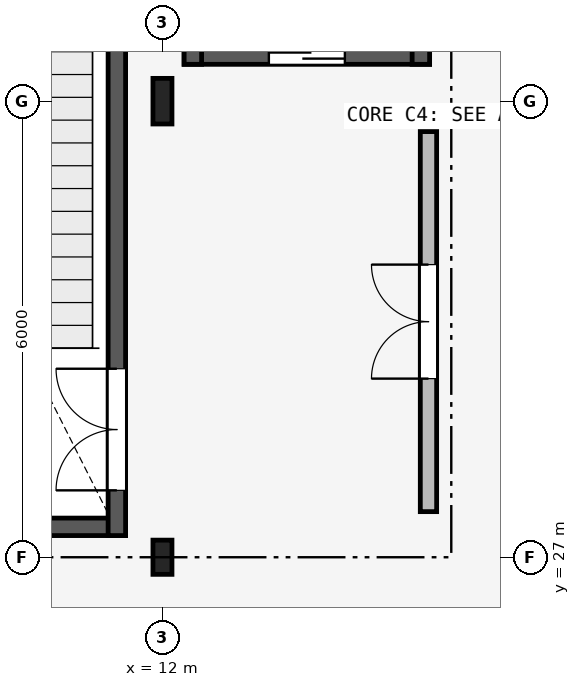
"""IFC4 building model, lengths in metres.
Left out: names, types, materials, properties, quantities, classifications, styles, units other than length and angle.
Written with IfcOpenShell. Run it as: python <this file> out.ifc"""

import sys

from ifc_helpers import new_model, si_unit, direction, frame, frame_2d, origin, origin_2d, place, context, subcontext, project, spatial, rectangle, i_section, extrude, element, fill, save


model = new_model("IFC4")
c1 = context("Model", 3, precision=1e-05, world=origin(), true_north=direction((0.0, 1.0)))
c2 = subcontext(c1, "Body", "Model", "MODEL_VIEW")
j1 = project(units=[si_unit("LENGTHUNIT", "METRE"), si_unit("PLANEANGLEUNIT", "RADIAN")], contexts=[c1])
p1 = place(None, origin())
s1 = spatial("IfcSite", under=j1, at=p1, CompositionType="ELEMENT")
p2 = place(p1, origin())
s2 = spatial("IfcBuilding", under=s1, at=p2, CompositionType="ELEMENT")
p3 = place(p2, frame((0.0, 0.0, 4.8)))
s3 = spatial("IfcBuildingStorey", under=s2, at=p3, CompositionType="ELEMENT", Elevation=4.8)
p4 = place(p3, frame((12.0, 27.0, 0.0), z_axis=(0.0, 0.0, 1.0), x_axis=(1.0, 0.0, 0.0)))
e1 = element("IfcColumn", 1, at=p4, inside=s3, PredefinedType="COLUMN", context=c2, shape_type="SweptSolid", body=[
    extrude(i_section(OverallWidth=0.25, OverallDepth=0.45, WebThickness=0.011, FlangeThickness=0.014, FilletRadius=0.015, at=origin_2d()), origin(), (0.0, 0.0, 1.0), 4.5),
])
p5 = place(p3, frame((12.0, 33.0, 0.0), z_axis=(0.0, 0.0, 1.0), x_axis=(1.0, 0.0, 0.0)))
e2 = element("IfcColumn", 2, at=p5, inside=s3, PredefinedType="COLUMN", context=c2, shape_type="SweptSolid", body=[
    extrude(i_section(OverallWidth=0.25, OverallDepth=0.6, WebThickness=0.012, FlangeThickness=0.024, FilletRadius=0.017, at=origin_2d()), origin(), (0.0, 0.0, 1.0), 4.5),
])
p6 = place(p3, frame((6.485, 27.4, 0.0), z_axis=(0.0, 0.0, 1.0), x_axis=(1.0, 0.0, 0.0)))
e3 = element("IfcWall", 3, at=p6, inside=s3, PredefinedType="SHEAR", context=c2, shape_type="SweptSolid", body=[
    extrude(rectangle(XDim=5.03, YDim=0.23, at=frame_2d((2.515, 0.0))), origin(), (0.0, 0.0, 1.0), 4.36),
])
p7 = place(p3, frame((11.4, 27.285, 0.0), z_axis=(0.0, 0.0, 1.0), x_axis=(0.0, 1.0, 0.0)))
e4 = element("IfcWall", 4, at=p7, inside=s3, PredefinedType="SHEAR", context=c2, shape_type="SweptSolid", body=[
    extrude(rectangle(XDim=9.63, YDim=0.23, at=frame_2d((4.815, 0.0))), origin(), (0.0, 0.0, 1.0), 4.36),
])
p8 = place(p7, frame((0.595, 0.0, 0.0)))
e5 = element("IfcOpeningElement", 5, at=p8, cuts=e4, PredefinedType="OPENING", context=c2, shape_type="SweptSolid", body=[
    extrude(rectangle(XDim=1.6, YDim=2.2, at=frame_2d((0.8, 1.1))), frame((0.0, 0.125, 0.0), z_axis=(0.0, -1.0, 0.0), x_axis=(1.0, 0.0, 0.0)), (0.0, 0.0, 1.0), 0.25),
])
p9 = place(p3, frame((15.5, 27.6, 0.0), z_axis=(0.0, 0.0, 1.0), x_axis=(0.0, 1.0, 0.0)))
e6 = element("IfcWall", 6, at=p9, inside=s3, PredefinedType="PARTITIONING", context=c2, shape_type="SweptSolid", body=[
    extrude(rectangle(XDim=5.0, YDim=0.215, at=frame_2d((2.5, 0.0))), origin(), (0.0, 0.0, 1.0), 4.19),
])
p10 = place(p9, frame((1.75, 0.0, 0.0)))
e7 = element("IfcOpeningElement", 7, at=p10, cuts=e6, PredefinedType="OPENING", context=c2, shape_type="SweptSolid", body=[
    extrude(rectangle(XDim=1.5, YDim=2.15, at=frame_2d((0.75, 1.075))), frame((0.0, 0.117, 0.0), z_axis=(0.0, -1.0, 0.0), x_axis=(1.0, 0.0, 0.0)), (0.0, 0.0, 1.0), 0.235),
])
p11 = place(p3, frame((12.285, 33.6, 0.0), z_axis=(0.0, 0.0, 1.0), x_axis=(1.0, 0.0, 0.0)))
e8 = element("IfcWall", 8, at=p11, inside=s3, PredefinedType="SHEAR", context=c2, shape_type="SweptSolid", body=[
    extrude(rectangle(XDim=3.23, YDim=0.23, at=frame_2d((1.615, 0.0))), origin(), (0.0, 0.0, 1.0), 4.5),
])
p12 = place(p11, frame((1.115, 0.0, 0.0)))
e9 = element("IfcOpeningElement", 9, at=p12, cuts=e8, PredefinedType="OPENING", context=c2, shape_type="SweptSolid", body=[
    extrude(rectangle(XDim=1.0, YDim=2.15, at=frame_2d((0.5, 1.075))), frame((0.0, 0.125, 0.0), z_axis=(0.0, -1.0, 0.0), x_axis=(1.0, 0.0, 0.0)), (0.0, 0.0, 1.0), 0.25),
])
for number, where, z_axis, x_axis in (
    (10, (15.4, 33.485, 0.0), (0.0, 0.0, 1.0), (0.0, 1.0, 0.0)),
    (11, (12.4, 37.115, 0.0), (0.0, 0.0, 1.0), (0.0, -1.0, 0.0)),
):
    element("IfcWall", number, at=place(p3, frame(where, z_axis=z_axis, x_axis=x_axis)), inside=s3, PredefinedType="SHEAR", context=c2, shape_type="SweptSolid", body=[
        extrude(rectangle(XDim=3.63, YDim=0.23, at=frame_2d((1.815, 0.0))), origin(), (0.0, 0.0, 1.0), 4.5),
    ])
p13 = place(p8, origin())
e12 = element("IfcDoor", 12, at=p13, inside=s3, OperationType="DOUBLE_DOOR_SINGLE_SWING", PredefinedType="DOOR", context=c2, shape_type="SweptSolid", body=[
    extrude(rectangle(XDim=1.6, YDim=2.2, at=frame_2d((0.8, 1.1))), frame((0.0, 0.025, 0.0), z_axis=(0.0, -1.0, 0.0), x_axis=(1.0, 0.0, 0.0)), (0.0, 0.0, 1.0), 0.05),
])
fill(e5, e12)
p14 = place(p10, origin())
e13 = element("IfcDoor", 13, at=p14, inside=s3, OperationType="DOUBLE_DOOR_SINGLE_SWING", PredefinedType="DOOR", context=c2, shape_type="SweptSolid", body=[
    extrude(rectangle(XDim=1.5, YDim=2.15, at=frame_2d((0.75, 1.075))), frame((0.0, 0.025, 0.0), z_axis=(0.0, -1.0, 0.0), x_axis=(1.0, 0.0, 0.0)), (0.0, 0.0, 1.0), 0.05),
])
fill(e7, e13)
p15 = place(p12, origin())
e14 = element("IfcDoor", 14, at=p15, inside=s3, OperationType="SLIDING_TO_LEFT", PredefinedType="DOOR", context=c2, shape_type="SweptSolid", body=[
    extrude(rectangle(XDim=1.0, YDim=2.15, at=frame_2d((0.5, 1.075))), frame((0.0, 0.025, 0.0), z_axis=(0.0, -1.0, 0.0), x_axis=(1.0, 0.0, 0.0)), (0.0, 0.0, 1.0), 0.05),
])
fill(e9, e14)
save(model, sys.argv[1])
